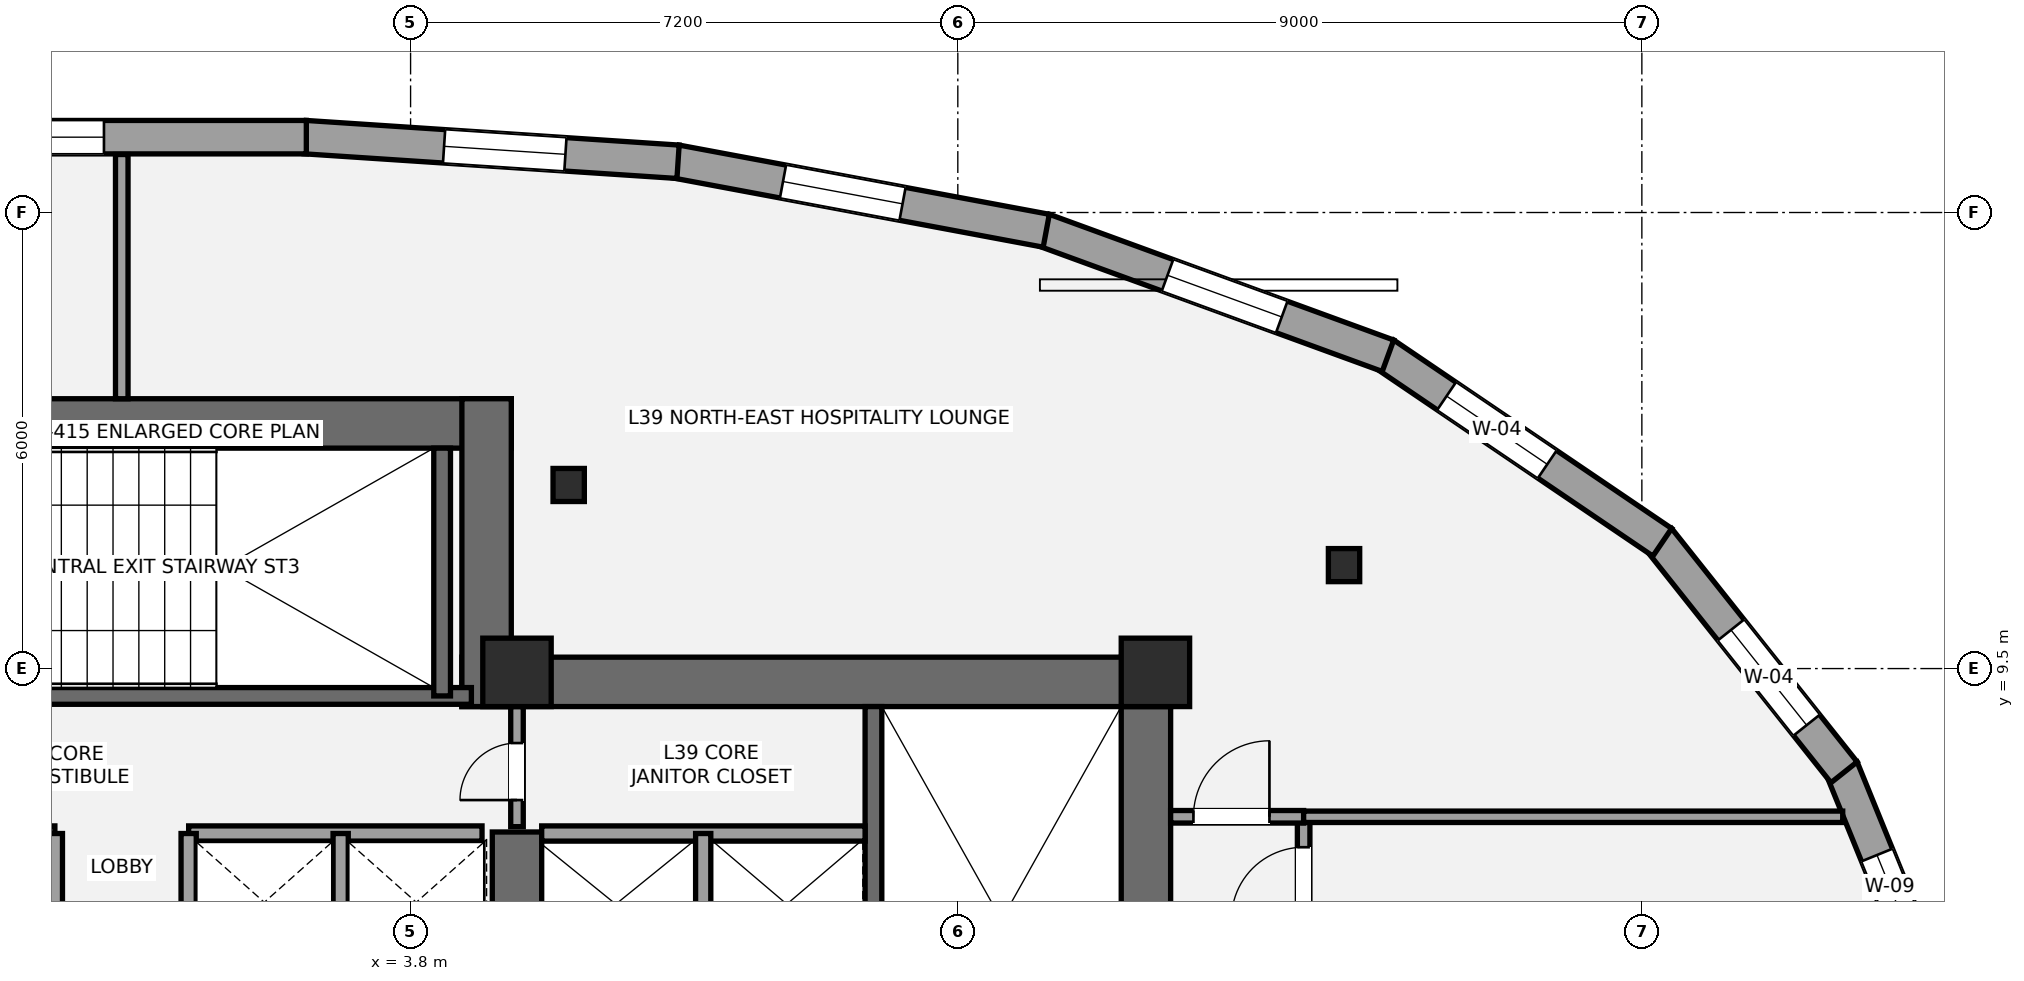
"""IFC4 building model, lengths in metres.
Left out: names, types, materials, properties, quantities, classifications, styles, units other than length and angle.
Written with IfcOpenShell. Run it as: python <this file> out.ifc"""

import sys

from ifc_helpers import new_model, si_unit, direction, frame, frame_2d, origin, origin_2d, place, context, subcontext, project, spatial, rectangle, i_section, extrude, element, fill, save


model = new_model("IFC4")
c1 = context("Model", 3, precision=1e-05, world=origin(), true_north=direction((0.0, 1.0)))
c2 = subcontext(c1, "Body", "Model", "MODEL_VIEW")
j1 = project(units=[si_unit("LENGTHUNIT", "METRE"), si_unit("PLANEANGLEUNIT", "RADIAN")], contexts=[c1])
p1 = place(None, origin())
s1 = spatial("IfcSite", under=j1, at=p1, CompositionType="ELEMENT")
p2 = place(p1, origin())
s2 = spatial("IfcBuilding", under=s1, at=p2, CompositionType="ELEMENT")
p3 = place(p2, frame((0.0, 0.0, 147.0)))
s3 = spatial("IfcBuildingStorey", under=s2, at=p3, CompositionType="ELEMENT", Elevation=147.0)
p4 = place(p3, frame((13.475, 1.2, 0.0), z_axis=(0.0, 0.0, 1.0), x_axis=(0.0, 1.0, 0.0)))
e1 = element("IfcWall", 1, at=p4, inside=s3, PredefinedType="SHEAR", context=c2, shape_type="SweptSolid", body=[
    extrude(rectangle(XDim=8.45, YDim=0.65, at=frame_2d((4.225, 0.0))), origin(), (0.0, 0.0, 1.0), 3.2),
])
p5 = place(p3, frame((4.475, 9.325, 0.0), z_axis=(0.0, 0.0, 1.0), x_axis=(1.0, 0.0, 0.0)))
e2 = element("IfcWall", 2, at=p5, inside=s3, PredefinedType="SHEAR", context=c2, shape_type="SweptSolid", body=[
    extrude(rectangle(XDim=9.325, YDim=0.65, at=frame_2d((4.663, 0.0))), origin(), (0.0, 0.0, 1.0), 3.2),
])
p6 = place(p3, frame((5.2, 5.35, 0.0), z_axis=(0.0, 0.0, 1.0), x_axis=(0.0, 1.0, 0.0)))
e3 = element("IfcWall", 3, at=p6, inside=s3, PredefinedType="SHEAR", context=c2, shape_type="SweptSolid", body=[
    extrude(rectangle(XDim=2.0, YDim=0.65, at=frame_2d((1.0, 0.0))), origin(), (0.0, 0.0, 1.0), 3.2),
])
p7 = place(p3, frame((9.89, 1.85, 0.0), z_axis=(0.0, 0.0, 1.0), x_axis=(0.0, 1.0, 0.0)))
e4 = element("IfcWall", 4, at=p7, inside=s3, PredefinedType="SHEAR", context=c2, shape_type="SweptSolid", body=[
    extrude(rectangle(XDim=7.15, YDim=0.22, at=frame_2d((3.575, 0.0))), origin(), (0.0, 0.0, 1.0), 3.2),
])
p8 = place(p3, frame((-5.125, 12.725, 0.0), z_axis=(0.0, 0.0, 1.0), x_axis=(1.0, 0.0, 0.0)))
e5 = element("IfcWall", 5, at=p8, inside=s3, PredefinedType="SHEAR", context=c2, shape_type="SweptSolid", body=[
    extrude(rectangle(XDim=10.25, YDim=0.65, at=frame_2d((5.125, 0.0))), origin(), (0.0, 0.0, 1.0), 3.2),
])
p9 = place(p3, frame((4.8, 9.0, 0.0), z_axis=(0.0, 0.0, 1.0), x_axis=(0.0, 1.0, 0.0)))
e6 = element("IfcWall", 6, at=p9, inside=s3, PredefinedType="SHEAR", context=c2, shape_type="SweptSolid", body=[
    extrude(rectangle(XDim=4.05, YDim=0.65, at=frame_2d((2.025, 0.0))), origin(), (0.0, 0.0, 1.0), 3.2),
])
p10 = place(p3, frame((-4.7, 9.14, 0.0), z_axis=(0.0, 0.0, 1.0), x_axis=(1.0, 0.0, 0.0)))
e7 = element("IfcWall", 7, at=p10, inside=s3, PredefinedType="SHEAR", context=c2, shape_type="SweptSolid", body=[
    extrude(rectangle(XDim=9.3, YDim=0.22, at=frame_2d((4.65, 0.0))), origin(), (0.0, 0.0, 1.0), 3.2),
])
p11 = place(p10, frame((1.15, 0.0, 0.0)))
e8 = element("IfcOpeningElement", 8, at=p11, cuts=e7, PredefinedType="OPENING", context=c2, shape_type="SweptSolid", body=[
    extrude(rectangle(XDim=1.05, YDim=2.15, at=frame_2d((0.525, 1.075))), frame((0.0, 0.12, 0.0), z_axis=(0.0, -1.0, 0.0), x_axis=(1.0, 0.0, 0.0)), (0.0, 0.0, 1.0), 0.24),
])
p12 = place(p3, frame((4.215, 9.14, 0.0), z_axis=(0.0, 0.0, 1.0), x_axis=(0.0, 1.0, 0.0)))
e9 = element("IfcWall", 9, at=p12, inside=s3, PredefinedType="SHEAR", context=c2, shape_type="SweptSolid", body=[
    extrude(rectangle(XDim=3.26, YDim=0.22, at=frame_2d((1.63, 0.0))), origin(), (0.0, 0.0, 1.0), 3.2),
])
for number, where, z_axis, x_axis in (
    (10, (5.2, 9.45, 0.0), (0.0, 0.0, 1.0), (1.0, 0.0, 0.0)),
    (11, (13.6, 9.45, 0.0), (0.0, 0.0, 1.0), (1.0, 0.0, 0.0)),
):
    element("IfcColumn", number, at=place(p3, frame(where, z_axis=z_axis, x_axis=x_axis)), inside=s3, PredefinedType="COLUMN", context=c2, shape_type="SweptSolid", body=[
        extrude(rectangle(XDim=0.9, YDim=0.9, at=origin_2d()), origin(), (0.0, 0.0, 1.0), 3.2),
    ])
for number, where, z_axis, x_axis in (
    (12, (16.082, 10.861, 0.0), (0.0, 0.0, 1.0), (1.0, 0.0, 0.0)),
    (13, (5.88, 11.915, 0.0), (0.0, 0.0, 1.0), (1.0, 0.0, 0.0)),
):
    element("IfcColumn", number, at=place(p3, frame(where, z_axis=z_axis, x_axis=x_axis)), inside=s3, PredefinedType="COLUMN", context=c2, shape_type="SweptSolid", body=[
        extrude(i_section(OverallWidth=0.412, OverallDepth=0.435, WebThickness=0.036, FlangeThickness=0.057, at=origin_2d()), origin(), (0.0, 0.0, 1.0), 3.2),
    ])
p13 = place(p3, frame((22.629, 8.189, 0.0), z_axis=(0.0, 0.0, 1.0), x_axis=(0.376863872061, -0.926268655378, 0.0)))
e14 = element("IfcWall", 14, at=p13, inside=s3, PredefinedType="STANDARD", context=c2, shape_type="SweptSolid", body=[
    extrude(rectangle(XDim=3.564, YDim=0.44, at=frame_2d((1.782, 0.0))), origin(), (0.0, 0.0, 1.0), 2.315),
])
p14 = place(p13, frame((1.234, 0.0, 0.58)))
e15 = element("IfcOpeningElement", 15, at=p14, cuts=e14, PredefinedType="OPENING", context=c2, shape_type="SweptSolid", body=[
    extrude(rectangle(XDim=0.9, YDim=1.35, at=frame_2d((0.45, 0.675))), frame((0.0, 0.23, 0.0), z_axis=(0.0, -1.0, 0.0), x_axis=(1.0, 0.0, 0.0)), (0.0, 0.0, 1.0), 0.46),
])
p15 = place(p3, frame((20.22, 11.207, 0.0), z_axis=(0.0, 0.0, 1.0), x_axis=(0.622149266174, -0.782898646441, 0.0)))
e16 = element("IfcWall", 16, at=p15, inside=s3, PredefinedType="STANDARD", context=c2, shape_type="SweptSolid", body=[
    extrude(rectangle(XDim=3.923, YDim=0.44, at=frame_2d((1.961, 0.0))), origin(), (0.0, 0.0, 1.0), 2.315),
])
p16 = place(p15, frame((1.531, 0.0, 0.58)))
e17 = element("IfcOpeningElement", 17, at=p16, cuts=e16, PredefinedType="OPENING", context=c2, shape_type="SweptSolid", body=[
    extrude(rectangle(XDim=1.6, YDim=1.55, at=frame_2d((0.8, 0.775))), frame((0.0, 0.23, 0.0), z_axis=(0.0, -1.0, 0.0), x_axis=(1.0, 0.0, 0.0)), (0.0, 0.0, 1.0), 0.46),
])
p17 = place(p3, frame((16.612, 13.64, 0.0), z_axis=(0.0, 0.0, 1.0), x_axis=(0.827774624611, -0.561060755044, 0.0)))
e18 = element("IfcWall", 18, at=p17, inside=s3, PredefinedType="STANDARD", context=c2, shape_type="SweptSolid", body=[
    extrude(rectangle(XDim=4.417, YDim=0.44, at=frame_2d((2.209, 0.0))), origin(), (0.0, 0.0, 1.0), 2.315),
])
p18 = place(p17, frame((0.99, 0.0, 0.58)))
e19 = element("IfcOpeningElement", 19, at=p18, cuts=e18, PredefinedType="OPENING", context=c2, shape_type="SweptSolid", body=[
    extrude(rectangle(XDim=1.6, YDim=1.55, at=frame_2d((0.8, 0.775))), frame((0.0, 0.23, 0.0), z_axis=(0.0, -1.0, 0.0), x_axis=(1.0, 0.0, 0.0)), (0.0, 0.0, 1.0), 0.46),
])
p19 = place(p3, frame((12.129, 15.27, 0.0), z_axis=(0.0, 0.0, 1.0), x_axis=(0.939349296455, -0.342961950147, 0.0)))
e20 = element("IfcWall", 20, at=p19, inside=s3, PredefinedType="STANDARD", context=c2, shape_type="SweptSolid", body=[
    extrude(rectangle(XDim=4.823, YDim=0.44, at=frame_2d((2.412, 0.0))), origin(), (0.0, 0.0, 1.0), 2.315),
])
p20 = place(p19, frame((1.736, 0.0, 0.58)))
e21 = element("IfcOpeningElement", 21, at=p20, cuts=e20, PredefinedType="OPENING", context=c2, shape_type="SweptSolid", body=[
    extrude(rectangle(XDim=1.6, YDim=1.55, at=frame_2d((0.8, 0.775))), frame((0.0, 0.23, 0.0), z_axis=(0.0, -1.0, 0.0), x_axis=(1.0, 0.0, 0.0)), (0.0, 0.0, 1.0), 0.46),
])
p21 = place(p3, frame((7.293, 16.171, 0.0), z_axis=(0.0, 0.0, 1.0), x_axis=(0.98297578121, -0.183735172338, 0.0)))
e22 = element("IfcWall", 22, at=p21, inside=s3, PredefinedType="STANDARD", context=c2, shape_type="SweptSolid", body=[
    extrude(rectangle(XDim=4.955, YDim=0.44, at=frame_2d((2.478, 0.0))), origin(), (0.0, 0.0, 1.0), 2.315),
])
p22 = place(p21, frame((1.431, 0.0, 0.58)))
e23 = element("IfcOpeningElement", 23, at=p22, cuts=e22, PredefinedType="OPENING", context=c2, shape_type="SweptSolid", body=[
    extrude(rectangle(XDim=1.6, YDim=1.55, at=frame_2d((0.8, 0.775))), frame((0.0, 0.23, 0.0), z_axis=(0.0, -1.0, 0.0), x_axis=(1.0, 0.0, 0.0)), (0.0, 0.0, 1.0), 0.46),
])
p23 = place(p3, frame((2.414, 16.492, 0.0), z_axis=(0.0, 0.0, 1.0), x_axis=(0.997822793171, -0.065952054018, 0.0)))
e24 = element("IfcWall", 24, at=p23, inside=s3, PredefinedType="STANDARD", context=c2, shape_type="SweptSolid", body=[
    extrude(rectangle(XDim=4.916, YDim=0.44, at=frame_2d((2.458, 0.0))), origin(), (0.0, 0.0, 1.0), 2.315),
])
p24 = place(p23, frame((1.831, 0.0, 0.58)))
e25 = element("IfcOpeningElement", 25, at=p24, cuts=e24, PredefinedType="OPENING", context=c2, shape_type="SweptSolid", body=[
    extrude(rectangle(XDim=1.6, YDim=1.55, at=frame_2d((0.8, 0.775))), frame((0.0, 0.23, 0.0), z_axis=(0.0, -1.0, 0.0), x_axis=(1.0, 0.0, 0.0)), (0.0, 0.0, 1.0), 0.46),
])
p25 = place(p3, frame((-2.428, 16.491, 0.0), z_axis=(0.0, 0.0, 1.0), x_axis=(1.0, 0.0, 0.0)))
e26 = element("IfcWall", 26, at=p25, inside=s3, PredefinedType="STANDARD", context=c2, shape_type="SweptSolid", body=[
    extrude(rectangle(XDim=4.856, YDim=0.44, at=frame_2d((2.428, 0.0))), origin(), (0.0, 0.0, 1.0), 2.315),
])
p26 = place(p25, frame((0.594, 0.0, 0.58)))
e27 = element("IfcOpeningElement", 27, at=p26, cuts=e26, PredefinedType="OPENING", context=c2, shape_type="SweptSolid", body=[
    extrude(rectangle(XDim=1.6, YDim=1.55, at=frame_2d((0.8, 0.775))), frame((0.0, 0.23, 0.0), z_axis=(0.0, -1.0, 0.0), x_axis=(1.0, 0.0, 0.0)), (0.0, 0.0, 1.0), 0.46),
])
p27 = place(p3, frame((5.525, 7.33, 0.0), z_axis=(0.0, 0.0, 1.0), x_axis=(1.0, 0.0, 0.0)))
e28 = element("IfcWall", 28, at=p27, inside=s3, PredefinedType="SOLIDWALL", context=c2, shape_type="SweptSolid", body=[
    extrude(rectangle(XDim=4.255, YDim=0.2, at=frame_2d((2.127, 0.0))), origin(), (0.0, 0.0, 1.0), 3.02),
])
p28 = place(p3, frame((7.65, 5.47, 0.0), z_axis=(0.0, 0.0, 1.0), x_axis=(0.0, 1.0, 0.0)))
e29 = element("IfcWall", 29, at=p28, inside=s3, PredefinedType="SOLIDWALL", context=c2, shape_type="SweptSolid", body=[
    extrude(rectangle(XDim=1.86, YDim=0.2, at=frame_2d((0.93, 0.0))), origin(), (0.0, 0.0, 1.0), 3.02),
])
for number, where, z_axis, x_axis in (
    (30, (-4.74, 7.33, 0.0), (0.0, 0.0, 1.0), (1.0, 0.0, 0.0)),
    (31, (0.88, 7.33, 0.0), (0.0, 0.0, 1.0), (1.0, 0.0, 0.0)),
):
    element("IfcWall", number, at=place(p3, frame(where, z_axis=z_axis, x_axis=x_axis)), inside=s3, PredefinedType="SOLIDWALL", context=c2, shape_type="SweptSolid", body=[
        extrude(rectangle(XDim=3.86, YDim=0.2, at=frame_2d((1.93, 0.0))), origin(), (0.0, 0.0, 1.0), 3.02),
    ])
for number, where, z_axis, x_axis in (
    (32, (2.88, 5.52, 0.0), (0.0, 0.0, 1.0), (0.0, 1.0, 0.0)),
    (33, (-0.88, 5.52, 0.0), (0.0, 0.0, 1.0), (0.0, 1.0, 0.0)),
    (34, (0.88, 5.52, 0.0), (0.0, 0.0, 1.0), (0.0, 1.0, 0.0)),
):
    element("IfcWall", number, at=place(p3, frame(where, z_axis=z_axis, x_axis=x_axis)), inside=s3, PredefinedType="SOLIDWALL", context=c2, shape_type="SweptSolid", body=[
        extrude(rectangle(XDim=1.81, YDim=0.2, at=frame_2d((0.905, 0.0))), origin(), (0.0, 0.0, 1.0), 3.02),
    ])
p29 = place(p3, frame((5.2, 7.42, 0.0), z_axis=(0.0, 0.0, 1.0), x_axis=(0.0, 1.0, 0.0)))
e35 = element("IfcWall", 35, at=p29, inside=s3, PredefinedType="PARTITIONING", context=c2, shape_type="SweptSolid", body=[
    extrude(rectangle(XDim=1.58, YDim=0.165, at=frame_2d((0.79, 0.0))), origin(), (0.0, 0.0, 1.0), 3.02),
])
p30 = place(p29, frame((0.35, 0.0, 0.0)))
e36 = element("IfcOpeningElement", 36, at=p30, cuts=e35, PredefinedType="OPENING", context=c2, shape_type="SweptSolid", body=[
    extrude(rectangle(XDim=0.75, YDim=2.1, at=frame_2d((0.375, 1.05))), frame((0.0, 0.093, 0.0), z_axis=(0.0, -1.0, 0.0), x_axis=(1.0, 0.0, 0.0)), (0.0, 0.0, 1.0), 0.185),
])
p31 = place(p3, frame((15.55, -13.778, 0.0), z_axis=(0.0, 0.0, 1.0), x_axis=(0.0, 1.0, 0.0)))
e37 = element("IfcWall", 37, at=p31, inside=s3, PredefinedType="PARTITIONING", context=c2, shape_type="SweptSolid", body=[
    extrude(rectangle(XDim=21.328, YDim=0.165, at=frame_2d((10.664, 0.0))), origin(), (0.0, 0.0, 1.0), 2.473),
])
p32 = place(p31, frame((6.777, 0.0, 0.0)))
e38 = element("IfcOpeningElement", 38, at=p32, cuts=e37, PredefinedType="OPENING", context=c2, shape_type="SweptSolid", body=[
    extrude(rectangle(XDim=0.85, YDim=2.1, at=frame_2d((0.425, 1.05))), frame((0.0, 0.093, 0.0), z_axis=(0.0, -1.0, 0.0), x_axis=(1.0, 0.0, 0.0)), (0.0, 0.0, 1.0), 0.185),
])
p33 = place(p31, frame((10.827, 0.0, 0.0)))
e39 = element("IfcOpeningElement", 39, at=p33, cuts=e37, PredefinedType="OPENING", context=c2, shape_type="SweptSolid", body=[
    extrude(rectangle(XDim=0.95, YDim=2.15, at=frame_2d((0.475, 1.075))), frame((0.0, 0.093, 0.0), z_axis=(0.0, -1.0, 0.0), x_axis=(1.0, 0.0, 0.0)), (0.0, 0.0, 1.0), 0.185),
])
p34 = place(p31, frame((15.227, 0.0, 0.0)))
e40 = element("IfcOpeningElement", 40, at=p34, cuts=e37, PredefinedType="OPENING", context=c2, shape_type="SweptSolid", body=[
    extrude(rectangle(XDim=0.95, YDim=2.15, at=frame_2d((0.475, 1.075))), frame((0.0, 0.093, 0.0), z_axis=(0.0, -1.0, 0.0), x_axis=(1.0, 0.0, 0.0)), (0.0, 0.0, 1.0), 0.185),
])
p35 = place(p31, frame((19.977, 0.0, 0.0)))
e41 = element("IfcOpeningElement", 41, at=p35, cuts=e37, PredefinedType="OPENING", context=c2, shape_type="SweptSolid", body=[
    extrude(rectangle(XDim=0.95, YDim=2.15, at=frame_2d((0.475, 1.075))), frame((0.0, 0.093, 0.0), z_axis=(0.0, -1.0, 0.0), x_axis=(1.0, 0.0, 0.0)), (0.0, 0.0, 1.0), 0.185),
])
p36 = place(p3, frame((13.8, 7.55, 0.0), z_axis=(0.0, 0.0, 1.0), x_axis=(1.0, 0.0, 0.0)))
e42 = element("IfcWall", 42, at=p36, inside=s3, PredefinedType="PARTITIONING", context=c2, shape_type="SweptSolid", body=[
    extrude(rectangle(XDim=1.75, YDim=0.165, at=frame_2d((0.875, 0.0))), origin(), (0.0, 0.0, 1.0), 2.473),
])
p37 = place(p36, frame((0.3, 0.0, 0.0)))
e43 = element("IfcOpeningElement", 43, at=p37, cuts=e42, PredefinedType="OPENING", context=c2, shape_type="SweptSolid", body=[
    extrude(rectangle(XDim=1.0, YDim=2.15, at=frame_2d((0.5, 1.075))), frame((0.0, 0.093, 0.0), z_axis=(0.0, -1.0, 0.0), x_axis=(1.0, 0.0, 0.0)), (0.0, 0.0, 1.0), 0.185),
])
p38 = place(p3, frame((15.55, 7.55, 0.0), z_axis=(0.0, 0.0, 1.0), x_axis=(1.0, 0.0, 0.0)))
e44 = element("IfcWall", 44, at=p38, inside=s3, PredefinedType="PLUMBINGWALL", context=c2, shape_type="SweptSolid", body=[
    extrude(rectangle(XDim=7.093, YDim=0.15, at=frame_2d((3.546, 0.0))), origin(), (0.0, 0.0, 1.0), 2.473),
])
p39 = place(p3, frame((0.0, 13.05, 0.0), z_axis=(0.0, 0.0, 1.0), x_axis=(0.0, 1.0, 0.0)))
e45 = element("IfcWall", 45, at=p39, inside=s3, PredefinedType="PARTITIONING", context=c2, shape_type="SweptSolid", body=[
    extrude(rectangle(XDim=3.213, YDim=0.165, at=frame_2d((1.606, 0.0))), origin(), (0.0, 0.0, 1.0), 3.02),
])
p40 = place(p14, origin())
e46 = element("IfcWindow", 46, at=p40, inside=s3, PartitioningType="SINGLE_PANEL", PredefinedType="WINDOW", context=c2, shape_type="SweptSolid", body=[
    extrude(rectangle(XDim=0.9, YDim=1.35, at=frame_2d((0.45, 0.675))), frame((0.0, -0.01, 0.0), z_axis=(0.0, -1.0, 0.0), x_axis=(1.0, 0.0, 0.0)), (0.0, 0.0, 1.0), 0.06),
])
fill(e15, e46)
p41 = place(p16, origin())
e47 = element("IfcWindow", 47, at=p41, inside=s3, PartitioningType="SINGLE_PANEL", PredefinedType="WINDOW", context=c2, shape_type="SweptSolid", body=[
    extrude(rectangle(XDim=1.6, YDim=1.55, at=frame_2d((0.8, 0.775))), frame((0.0, -0.01, 0.0), z_axis=(0.0, -1.0, 0.0), x_axis=(1.0, 0.0, 0.0)), (0.0, 0.0, 1.0), 0.06),
])
fill(e17, e47)
p42 = place(p18, origin())
e48 = element("IfcWindow", 48, at=p42, inside=s3, PartitioningType="SINGLE_PANEL", PredefinedType="WINDOW", context=c2, shape_type="SweptSolid", body=[
    extrude(rectangle(XDim=1.6, YDim=1.55, at=frame_2d((0.8, 0.775))), frame((0.0, -0.01, 0.0), z_axis=(0.0, -1.0, 0.0), x_axis=(1.0, 0.0, 0.0)), (0.0, 0.0, 1.0), 0.06),
])
fill(e19, e48)
p43 = place(p20, origin())
e49 = element("IfcWindow", 49, at=p43, inside=s3, PartitioningType="SINGLE_PANEL", PredefinedType="WINDOW", context=c2, shape_type="SweptSolid", body=[
    extrude(rectangle(XDim=1.6, YDim=1.55, at=frame_2d((0.8, 0.775))), frame((0.0, -0.01, 0.0), z_axis=(0.0, -1.0, 0.0), x_axis=(1.0, 0.0, 0.0)), (0.0, 0.0, 1.0), 0.06),
])
fill(e21, e49)
p44 = place(p22, origin())
e50 = element("IfcWindow", 50, at=p44, inside=s3, PartitioningType="SINGLE_PANEL", PredefinedType="WINDOW", context=c2, shape_type="SweptSolid", body=[
    extrude(rectangle(XDim=1.6, YDim=1.55, at=frame_2d((0.8, 0.775))), frame((0.0, -0.01, 0.0), z_axis=(0.0, -1.0, 0.0), x_axis=(1.0, 0.0, 0.0)), (0.0, 0.0, 1.0), 0.06),
])
fill(e23, e50)
p45 = place(p24, origin())
e51 = element("IfcWindow", 51, at=p45, inside=s3, PartitioningType="SINGLE_PANEL", PredefinedType="WINDOW", context=c2, shape_type="SweptSolid", body=[
    extrude(rectangle(XDim=1.6, YDim=1.55, at=frame_2d((0.8, 0.775))), frame((0.0, -0.01, 0.0), z_axis=(0.0, -1.0, 0.0), x_axis=(1.0, 0.0, 0.0)), (0.0, 0.0, 1.0), 0.06),
])
fill(e25, e51)
p46 = place(p26, origin())
e52 = element("IfcWindow", 52, at=p46, inside=s3, PartitioningType="SINGLE_PANEL", PredefinedType="WINDOW", context=c2, shape_type="SweptSolid", body=[
    extrude(rectangle(XDim=1.6, YDim=1.55, at=frame_2d((0.8, 0.775))), frame((0.0, -0.01, 0.0), z_axis=(0.0, -1.0, 0.0), x_axis=(1.0, 0.0, 0.0)), (0.0, 0.0, 1.0), 0.06),
])
fill(e27, e52)
p47 = place(p30, origin())
e53 = element("IfcDoor", 53, at=p47, inside=s3, OperationType="SINGLE_SWING_LEFT", PredefinedType="DOOR", context=c2, shape_type="SweptSolid", body=[
    extrude(rectangle(XDim=0.75, YDim=2.1, at=frame_2d((0.375, 1.05))), frame((0.0, 0.025, 0.0), z_axis=(0.0, -1.0, 0.0), x_axis=(1.0, 0.0, 0.0)), (0.0, 0.0, 1.0), 0.05),
])
fill(e36, e53)
p48 = place(p37, origin())
e54 = element("IfcDoor", 54, at=p48, inside=s3, OperationType="SINGLE_SWING_RIGHT", PredefinedType="DOOR", context=c2, shape_type="SweptSolid", body=[
    extrude(rectangle(XDim=1.0, YDim=2.15, at=frame_2d((0.5, 1.075))), frame((0.0, 0.025, 0.0), z_axis=(0.0, -1.0, 0.0), x_axis=(1.0, 0.0, 0.0)), (0.0, 0.0, 1.0), 0.05),
])
fill(e43, e54)
p49 = place(p35, origin())
e55 = element("IfcDoor", 55, at=p49, inside=s3, OperationType="SINGLE_SWING_LEFT", PredefinedType="DOOR", context=c2, shape_type="SweptSolid", body=[
    extrude(rectangle(XDim=0.95, YDim=2.15, at=frame_2d((0.475, 1.075))), frame((0.0, 0.025, 0.0), z_axis=(0.0, -1.0, 0.0), x_axis=(1.0, 0.0, 0.0)), (0.0, 0.0, 1.0), 0.05),
])
fill(e41, e55)
save(model, sys.argv[1])
